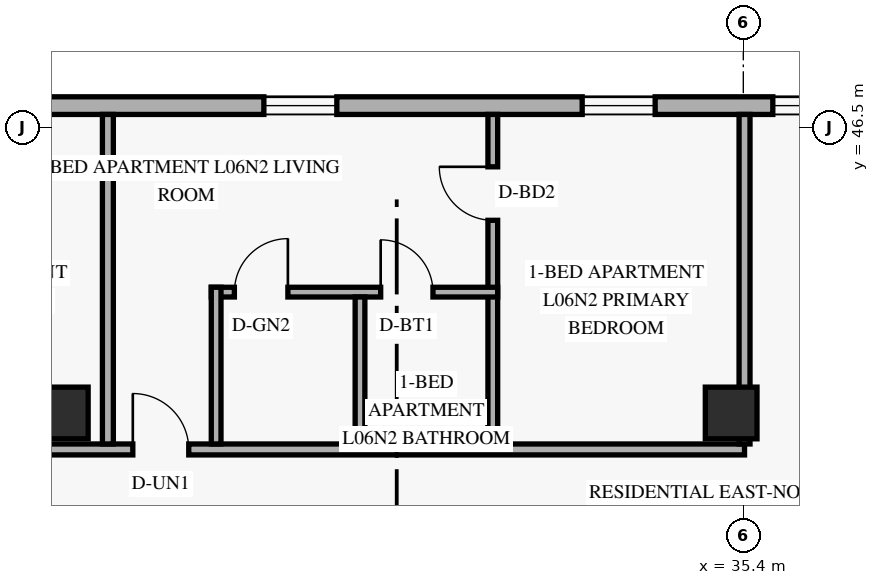
"""IFC4 building model, lengths in metres.
Left out: names, types, materials, properties, quantities, classifications, styles, units other than length and angle.
Written with IfcOpenShell. Run it as: python <this file> out.ifc"""

import sys

from ifc_helpers import new_model, si_unit, direction, frame, frame_2d, origin, origin_2d, place, context, subcontext, project, spatial, rectangle, extrude, element, fill, save


model = new_model("IFC4")
c1 = context("Model", 3, precision=1e-05, world=origin(), true_north=direction((0.0, 1.0)))
c2 = subcontext(c1, "Body", "Model", "MODEL_VIEW")
j1 = project(units=[si_unit("LENGTHUNIT", "METRE"), si_unit("PLANEANGLEUNIT", "RADIAN")], contexts=[c1])
p1 = place(None, origin())
s1 = spatial("IfcSite", under=j1, at=p1, CompositionType="ELEMENT")
p2 = place(p1, origin())
s2 = spatial("IfcBuilding", under=s1, at=p2, CompositionType="ELEMENT")
p3 = place(p2, frame((0.0, 0.0, 27.6)))
s3 = spatial("IfcBuildingStorey", under=s2, at=p3, CompositionType="ELEMENT", Elevation=27.6)
for number, where, z_axis, x_axis in (
    (1, (24.2, 41.8, 0.0), (0.0, 0.0, 1.0), (1.0, 0.0, 0.0)),
    (2, (35.2, 41.8, 0.0), (0.0, 0.0, 1.0), (1.0, 0.0, 0.0)),
):
    element("IfcColumn", number, at=place(p3, frame(where, z_axis=z_axis, x_axis=x_axis)), inside=s3, PredefinedType="COLUMN", context=c2, shape_type="SweptSolid", body=[
        extrude(rectangle(XDim=0.85, YDim=0.85, at=origin_2d()), origin(), (0.0, 0.0, 1.0), 3.6),
    ])
p4 = place(p3, frame((44.98, 46.855, 0.0), z_axis=(0.0, 0.0, 1.0), x_axis=(-1.0, 0.0, 0.0)))
e3 = element("IfcWall", 3, at=p4, inside=s3, PredefinedType="SOLIDWALL", context=c2, shape_type="SweptSolid", body=[
    extrude(rectangle(XDim=39.56, YDim=0.29, at=frame_2d((19.78, 0.0))), origin(), (0.0, 0.0, 1.0), 3.36),
])
p5 = place(p4, frame((35.52, 0.0, 0.85)))
e4 = element("IfcOpeningElement", 4, at=p5, cuts=e3, PredefinedType="OPENING", context=c2, shape_type="SweptSolid", body=[
    extrude(rectangle(XDim=1.2, YDim=1.5, at=frame_2d((0.6, 0.75))), frame((0.0, 0.155, 0.0), z_axis=(0.0, -1.0, 0.0), x_axis=(1.0, 0.0, 0.0)), (0.0, 0.0, 1.0), 0.31),
])
p6 = place(p4, frame((31.18, 0.0, 0.85)))
e5 = element("IfcOpeningElement", 5, at=p6, cuts=e3, PredefinedType="OPENING", context=c2, shape_type="SweptSolid", body=[
    extrude(rectangle(XDim=1.2, YDim=1.5, at=frame_2d((0.6, 0.75))), frame((0.0, 0.155, 0.0), z_axis=(0.0, -1.0, 0.0), x_axis=(1.0, 0.0, 0.0)), (0.0, 0.0, 1.0), 0.31),
])
p7 = place(p4, frame((26.925, 0.0, 0.85)))
e6 = element("IfcOpeningElement", 6, at=p7, cuts=e3, PredefinedType="OPENING", context=c2, shape_type="SweptSolid", body=[
    extrude(rectangle(XDim=1.2, YDim=1.5, at=frame_2d((0.6, 0.75))), frame((0.0, 0.155, 0.0), z_axis=(0.0, -1.0, 0.0), x_axis=(1.0, 0.0, 0.0)), (0.0, 0.0, 1.0), 0.31),
])
p8 = place(p4, frame((21.5, 0.0, 0.85)))
e7 = element("IfcOpeningElement", 7, at=p8, cuts=e3, PredefinedType="OPENING", context=c2, shape_type="SweptSolid", body=[
    extrude(rectangle(XDim=1.2, YDim=1.5, at=frame_2d((0.6, 0.75))), frame((0.0, 0.155, 0.0), z_axis=(0.0, -1.0, 0.0), x_axis=(1.0, 0.0, 0.0)), (0.0, 0.0, 1.0), 0.31),
])
p9 = place(p4, frame((16.265, 0.0, 0.85)))
e8 = element("IfcOpeningElement", 8, at=p9, cuts=e3, PredefinedType="OPENING", context=c2, shape_type="SweptSolid", body=[
    extrude(rectangle(XDim=1.2, YDim=1.5, at=frame_2d((0.6, 0.75))), frame((0.0, 0.155, 0.0), z_axis=(0.0, -1.0, 0.0), x_axis=(1.0, 0.0, 0.0)), (0.0, 0.0, 1.0), 0.31),
])
p10 = place(p4, frame((11.03, 0.0, 0.85)))
e9 = element("IfcOpeningElement", 9, at=p10, cuts=e3, PredefinedType="OPENING", context=c2, shape_type="SweptSolid", body=[
    extrude(rectangle(XDim=1.2, YDim=1.5, at=frame_2d((0.6, 0.75))), frame((0.0, 0.155, 0.0), z_axis=(0.0, -1.0, 0.0), x_axis=(1.0, 0.0, 0.0)), (0.0, 0.0, 1.0), 0.31),
])
p11 = place(p4, frame((7.895, 0.0, 0.85)))
e10 = element("IfcOpeningElement", 10, at=p11, cuts=e3, PredefinedType="OPENING", context=c2, shape_type="SweptSolid", body=[
    extrude(rectangle(XDim=1.2, YDim=1.5, at=frame_2d((0.6, 0.75))), frame((0.0, 0.155, 0.0), z_axis=(0.0, -1.0, 0.0), x_axis=(1.0, 0.0, 0.0)), (0.0, 0.0, 1.0), 0.31),
])
p12 = place(p4, frame((3.115, 0.0, 0.85)))
e11 = element("IfcOpeningElement", 11, at=p12, cuts=e3, PredefinedType="OPENING", context=c2, shape_type="SweptSolid", body=[
    extrude(rectangle(XDim=1.2, YDim=1.5, at=frame_2d((0.6, 0.75))), frame((0.0, 0.155, 0.0), z_axis=(0.0, -1.0, 0.0), x_axis=(1.0, 0.0, 0.0)), (0.0, 0.0, 1.0), 0.31),
])
p13 = place(p3, frame((14.1, 41.2, 0.0), z_axis=(0.0, 0.0, 1.0), x_axis=(1.0, 0.0, 0.0)))
e12 = element("IfcWall", 12, at=p13, inside=s3, PredefinedType="STANDARD", context=c2, shape_type="SweptSolid", body=[
    extrude(rectangle(XDim=21.32, YDim=0.18, at=frame_2d((10.66, 0.0))), origin(), (0.0, 0.0, 1.0), 2.649),
])
p14 = place(p13, frame((0.41, 0.0, 0.0)))
e13 = element("IfcOpeningElement", 13, at=p14, cuts=e12, PredefinedType="OPENING", context=c2, shape_type="SweptSolid", body=[
    extrude(rectangle(XDim=0.92, YDim=2.15, at=frame_2d((0.46, 1.075))), frame((0.0, 0.1, 0.0), z_axis=(0.0, -1.0, 0.0), x_axis=(1.0, 0.0, 0.0)), (0.0, 0.0, 1.0), 0.2),
])
p15 = place(p13, frame((11.26, 0.0, 0.0)))
e14 = element("IfcOpeningElement", 14, at=p15, cuts=e12, PredefinedType="OPENING", context=c2, shape_type="SweptSolid", body=[
    extrude(rectangle(XDim=0.92, YDim=2.15, at=frame_2d((0.46, 1.075))), frame((0.0, 0.1, 0.0), z_axis=(0.0, -1.0, 0.0), x_axis=(1.0, 0.0, 0.0)), (0.0, 0.0, 1.0), 0.2),
])
p16 = place(p3, frame((35.42, 41.29, 0.0), z_axis=(0.0, 0.0, 1.0), x_axis=(0.0, 1.0, 0.0)))
e15 = element("IfcWall", 15, at=p16, inside=s3, PredefinedType="PARTITIONING", context=c2, shape_type="SweptSolid", body=[
    extrude(rectangle(XDim=5.42, YDim=0.18, at=frame_2d((2.71, 0.0))), origin(), (0.0, 0.0, 1.0), 3.36),
])
p17 = place(p3, frame((24.95, 41.29, 0.0), z_axis=(0.0, 0.0, 1.0), x_axis=(0.0, 1.0, 0.0)))
e16 = element("IfcWall", 16, at=p17, inside=s3, PredefinedType="PARTITIONING", context=c2, shape_type="SweptSolid", body=[
    extrude(rectangle(XDim=5.42, YDim=0.18, at=frame_2d((2.71, 0.0))), origin(), (0.0, 0.0, 1.0), 2.809),
])
p18 = place(p3, frame((31.28, 41.29, 0.0), z_axis=(0.0, 0.0, 1.0), x_axis=(0.0, 1.0, 0.0)))
e17 = element("IfcWall", 17, at=p18, inside=s3, PredefinedType="PARTITIONING", context=c2, shape_type="SweptSolid", body=[
    extrude(rectangle(XDim=5.42, YDim=0.16, at=frame_2d((2.71, 0.0))), origin(), (0.0, 0.0, 1.0), 2.809),
])
p19 = place(p18, frame((3.679, 0.0, 0.0)))
e18 = element("IfcOpeningElement", 18, at=p19, cuts=e17, PredefinedType="OPENING", context=c2, shape_type="SweptSolid", body=[
    extrude(rectangle(XDim=0.88, YDim=2.14, at=frame_2d((0.44, 1.07))), frame((0.0, 0.09, 0.0), z_axis=(0.0, -1.0, 0.0), x_axis=(1.0, 0.0, 0.0)), (0.0, 0.0, 1.0), 0.18),
])
p20 = place(p3, frame((26.65, 43.788, 0.0), z_axis=(0.0, 0.0, 1.0), x_axis=(1.0, 0.0, 0.0)))
e19 = element("IfcWall", 19, at=p20, inside=s3, PredefinedType="PLUMBINGWALL", context=c2, shape_type="SweptSolid", body=[
    extrude(rectangle(XDim=4.71, YDim=0.16, at=frame_2d((2.355, 0.0))), origin(), (0.0, 0.0, 1.0), 3.36),
])
p21 = place(p20, frame((0.38, 0.0, 0.0)))
e20 = element("IfcOpeningElement", 20, at=p21, cuts=e19, PredefinedType="OPENING", context=c2, shape_type="SweptSolid", body=[
    extrude(rectangle(XDim=0.88, YDim=2.12, at=frame_2d((0.44, 1.06))), frame((0.0, 0.09, 0.0), z_axis=(0.0, -1.0, 0.0), x_axis=(1.0, 0.0, 0.0)), (0.0, 0.0, 1.0), 0.18),
])
p22 = place(p20, frame((2.786, 0.0, 0.0)))
e21 = element("IfcOpeningElement", 21, at=p22, cuts=e19, PredefinedType="OPENING", context=c2, shape_type="SweptSolid", body=[
    extrude(rectangle(XDim=0.86, YDim=2.12, at=frame_2d((0.43, 1.06))), frame((0.0, 0.09, 0.0), z_axis=(0.0, -1.0, 0.0), x_axis=(1.0, 0.0, 0.0)), (0.0, 0.0, 1.0), 0.18),
])
p23 = place(p3, frame((26.73, 41.29, 0.0), z_axis=(0.0, 0.0, 1.0), x_axis=(0.0, 1.0, 0.0)))
e22 = element("IfcWall", 22, at=p23, inside=s3, PredefinedType="PLUMBINGWALL", context=c2, shape_type="SweptSolid", body=[
    extrude(rectangle(XDim=2.577, YDim=0.16, at=frame_2d((1.289, 0.0))), origin(), (0.0, 0.0, 1.0), 2.809),
])
p24 = place(p3, frame((29.096, 41.29, 0.0), z_axis=(0.0, 0.0, 1.0), x_axis=(0.0, 1.0, 0.0)))
e23 = element("IfcWall", 23, at=p24, inside=s3, PredefinedType="PLUMBINGWALL", context=c2, shape_type="SweptSolid", body=[
    extrude(rectangle(XDim=2.417, YDim=0.16, at=frame_2d((1.209, 0.0))), origin(), (0.0, 0.0, 1.0), 2.809),
])
p25 = place(p9, origin())
e24 = element("IfcWindow", 24, at=p25, inside=s3, PartitioningType="SINGLE_PANEL", PredefinedType="WINDOW", context=c2, shape_type="SweptSolid", body=[
    extrude(rectangle(XDim=1.2, YDim=1.5, at=frame_2d((0.6, 0.75))), frame((0.0, 0.03, 0.0), z_axis=(0.0, -1.0, 0.0), x_axis=(1.0, 0.0, 0.0)), (0.0, 0.0, 1.0), 0.06),
])
fill(e8, e24)
p26 = place(p10, origin())
e25 = element("IfcWindow", 25, at=p26, inside=s3, PartitioningType="SINGLE_PANEL", PredefinedType="WINDOW", context=c2, shape_type="SweptSolid", body=[
    extrude(rectangle(XDim=1.2, YDim=1.5, at=frame_2d((0.6, 0.75))), frame((0.0, 0.03, 0.0), z_axis=(0.0, -1.0, 0.0), x_axis=(1.0, 0.0, 0.0)), (0.0, 0.0, 1.0), 0.06),
])
fill(e9, e25)
p27 = place(p11, origin())
e26 = element("IfcWindow", 26, at=p27, inside=s3, PartitioningType="SINGLE_PANEL", PredefinedType="WINDOW", context=c2, shape_type="SweptSolid", body=[
    extrude(rectangle(XDim=1.2, YDim=1.5, at=frame_2d((0.6, 0.75))), frame((0.0, 0.03, 0.0), z_axis=(0.0, -1.0, 0.0), x_axis=(1.0, 0.0, 0.0)), (0.0, 0.0, 1.0), 0.06),
])
fill(e10, e26)
p28 = place(p15, origin())
e27 = element("IfcDoor", 27, at=p28, inside=s3, OperationType="SINGLE_SWING_LEFT", PredefinedType="DOOR", context=c2, shape_type="SweptSolid", body=[
    extrude(rectangle(XDim=0.92, YDim=2.15, at=frame_2d((0.46, 1.075))), frame((0.0, 0.025, 0.0), z_axis=(0.0, -1.0, 0.0), x_axis=(1.0, 0.0, 0.0)), (0.0, 0.0, 1.0), 0.05),
])
fill(e14, e27)
p29 = place(p21, origin())
e28 = element("IfcDoor", 28, at=p29, inside=s3, OperationType="SINGLE_SWING_RIGHT", PredefinedType="DOOR", context=c2, shape_type="SweptSolid", body=[
    extrude(rectangle(XDim=0.88, YDim=2.12, at=frame_2d((0.44, 1.06))), frame((0.0, 0.025, 0.0), z_axis=(0.0, -1.0, 0.0), x_axis=(1.0, 0.0, 0.0)), (0.0, 0.0, 1.0), 0.05),
])
fill(e20, e28)
p30 = place(p22, origin())
e29 = element("IfcDoor", 29, at=p30, inside=s3, OperationType="SINGLE_SWING_LEFT", PredefinedType="DOOR", context=c2, shape_type="SweptSolid", body=[
    extrude(rectangle(XDim=0.86, YDim=2.12, at=frame_2d((0.43, 1.06))), frame((0.0, 0.025, 0.0), z_axis=(0.0, -1.0, 0.0), x_axis=(1.0, 0.0, 0.0)), (0.0, 0.0, 1.0), 0.05),
])
fill(e21, e29)
p31 = place(p19, origin())
e30 = element("IfcDoor", 30, at=p31, inside=s3, OperationType="SINGLE_SWING_RIGHT", PredefinedType="DOOR", context=c2, shape_type="SweptSolid", body=[
    extrude(rectangle(XDim=0.88, YDim=2.14, at=frame_2d((0.44, 1.07))), frame((0.0, 0.025, 0.0), z_axis=(0.0, -1.0, 0.0), x_axis=(1.0, 0.0, 0.0)), (0.0, 0.0, 1.0), 0.05),
])
fill(e18, e30)
save(model, sys.argv[1])
